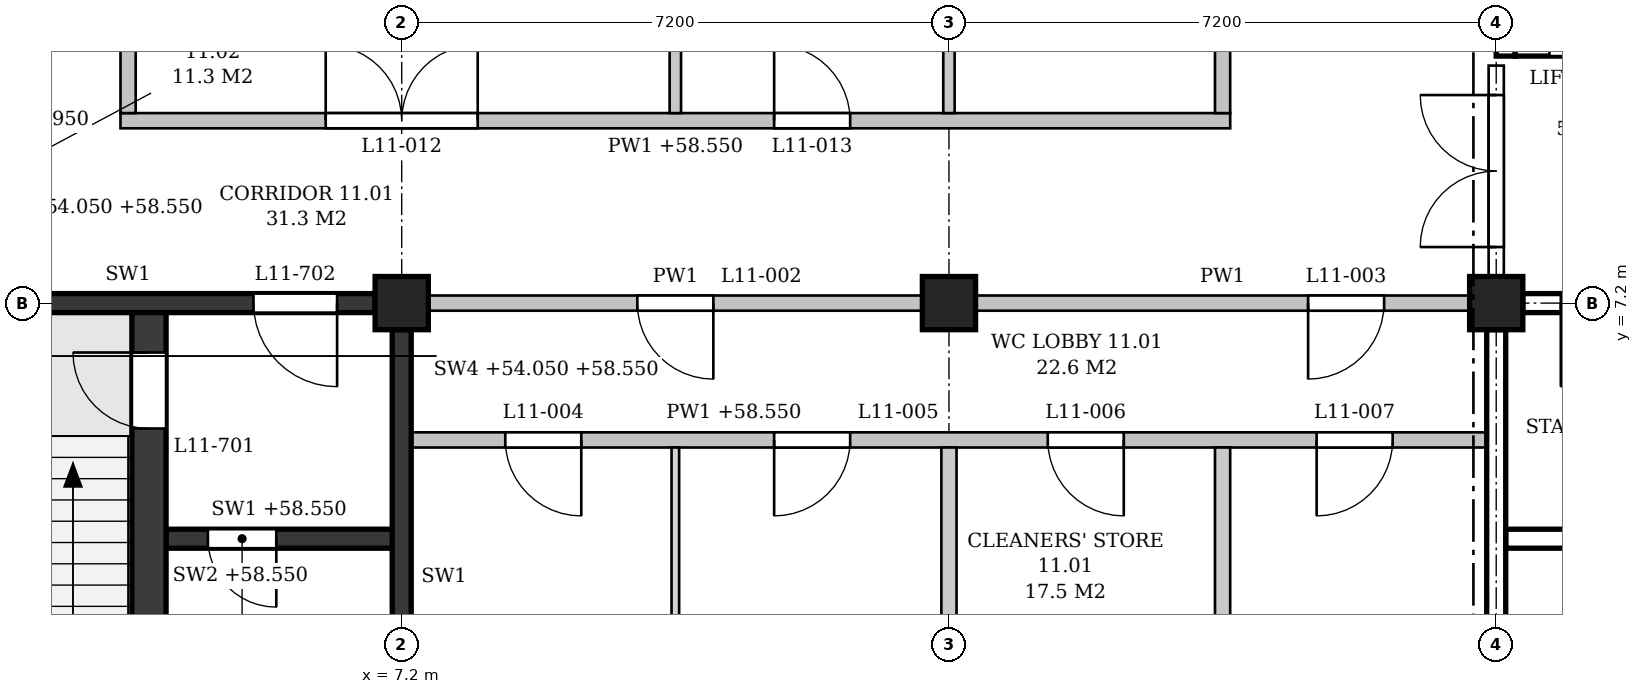
"""IFC4 building model, lengths in metres.
Left out: names, types, materials, properties, quantities, classifications, styles, units other than length and angle.
Written with IfcOpenShell. Run it as: python <this file> out.ifc"""

import sys

from ifc_helpers import new_model, si_unit, direction, frame, frame_2d, origin, origin_2d, place, context, subcontext, project, spatial, polyline, rectangle, outline, extrude, element, fill, save


model = new_model("IFC4")
c1 = context("Model", 3, precision=1e-05, world=origin(), true_north=direction((0.0, 1.0)))
c2 = subcontext(c1, "Body", "Model", "MODEL_VIEW")
j1 = project(units=[si_unit("LENGTHUNIT", "METRE"), si_unit("PLANEANGLEUNIT", "RADIAN")], contexts=[c1])
p1 = place(None, origin())
s1 = spatial("IfcSite", under=j1, at=p1, CompositionType="ELEMENT")
p2 = place(p1, origin())
s2 = spatial("IfcBuilding", under=s1, at=p2, CompositionType="ELEMENT")
p3 = place(p2, frame((0.0, 0.0, 54.3)))
s3 = spatial("IfcBuildingStorey", under=s2, at=p3, CompositionType="ELEMENT", Elevation=54.3)
for number, where, z_axis, x_axis in (
    (1, (7.2, 7.2, 0.0), (0.0, 0.0, 1.0), (1.0, 0.0, 0.0)),
    (2, (14.4, 7.2, 0.0), (0.0, 0.0, 1.0), (1.0, 0.0, 0.0)),
    (3, (21.6, 7.2, 0.0), (0.0, 0.0, 1.0), (1.0, 0.0, 0.0)),
):
    element("IfcColumn", number, at=place(p3, frame(where, z_axis=z_axis, x_axis=x_axis)), inside=s3, PredefinedType="COLUMN", context=c2, shape_type="SweptSolid", body=[
        extrude(rectangle(XDim=0.7, YDim=0.7, at=origin_2d()), origin(), (0.0, 0.0, 1.0), 4.5),
    ])
p4 = place(p3, frame((0.35, 7.2, 0.0), z_axis=(0.0, 0.0, 1.0), x_axis=(1.0, 0.0, 0.0)))
e4 = element("IfcWall", 4, at=p4, inside=s3, PredefinedType="SHEAR", context=c2, shape_type="SweptSolid", body=[
    extrude(rectangle(XDim=6.5, YDim=0.25, at=frame_2d((3.25, 0.0))), origin(), (0.0, 0.0, 1.0), 3.55),
])
p5 = place(p4, frame((4.9, 0.0, 0.0)))
e5 = element("IfcOpeningElement", 5, at=p5, cuts=e4, PredefinedType="OPENING", context=c2, shape_type="SweptSolid", body=[
    extrude(rectangle(XDim=1.1, YDim=2.1, at=frame_2d((0.55, 1.05))), frame((0.0, 0.135, 0.0), z_axis=(0.0, -1.0, 0.0), x_axis=(1.0, 0.0, 0.0)), (0.0, 0.0, 1.0), 0.27),
])
p6 = place(p3, frame((7.2, 0.35, 0.0), z_axis=(0.0, 0.0, 1.0), x_axis=(0.0, 1.0, 0.0)))
e6 = element("IfcWall", 6, at=p6, inside=s3, PredefinedType="SHEAR", context=c2, shape_type="SweptSolid", body=[
    extrude(rectangle(XDim=6.5, YDim=0.25, at=frame_2d((3.25, 0.0))), origin(), (0.0, 0.0, 1.0), 3.55),
])
p7 = place(p3, frame((3.875, 0.15, 0.0), z_axis=(0.0, 0.0, 1.0), x_axis=(0.0, 1.0, 0.0)))
e7 = element("IfcWall", 7, at=p7, inside=s3, PredefinedType="SHEAR", context=c2, shape_type="SweptSolid", body=[
    extrude(rectangle(XDim=6.925, YDim=0.45, at=frame_2d((3.462, 0.0))), origin(), (0.0, 0.0, 1.0), 4.25),
])
p8 = place(p7, frame((5.4, 0.0, 0.0)))
e8 = element("IfcOpeningElement", 8, at=p8, cuts=e7, PredefinedType="OPENING", context=c2, shape_type="SweptSolid", body=[
    extrude(rectangle(XDim=1.0, YDim=2.1, at=frame_2d((0.5, 1.05))), frame((0.0, 0.235, 0.0), z_axis=(0.0, -1.0, 0.0), x_axis=(1.0, 0.0, 0.0)), (0.0, 0.0, 1.0), 0.47),
])
p9 = place(p3, frame((4.1, 4.1, 0.0), z_axis=(0.0, 0.0, 1.0), x_axis=(1.0, 0.0, 0.0)))
e9 = element("IfcWall", 9, at=p9, inside=s3, PredefinedType="SHEAR", context=c2, shape_type="SweptSolid", body=[
    extrude(rectangle(XDim=2.975, YDim=0.25, at=frame_2d((1.487, 0.0))), origin(), (0.0, 0.0, 1.0), 4.25),
])
p10 = place(p9, frame((0.55, 0.0, 0.0)))
e10 = element("IfcOpeningElement", 10, at=p10, cuts=e9, PredefinedType="OPENING", context=c2, shape_type="SweptSolid", body=[
    extrude(rectangle(XDim=0.9, YDim=2.1, at=frame_2d((0.45, 1.05))), frame((0.0, 0.135, 0.0), z_axis=(0.0, -1.0, 0.0), x_axis=(1.0, 0.0, 0.0)), (0.0, 0.0, 1.0), 0.27),
])
p11 = place(p3, frame((21.95, 7.2, 0.0), z_axis=(0.0, 0.0, 1.0), x_axis=(1.0, 0.0, 0.0)))
e11 = element("IfcWall", 11, at=p11, inside=s3, PredefinedType="SHEAR", context=c2, shape_type="SweptSolid", body=[
    extrude(rectangle(XDim=6.5, YDim=0.25, at=frame_2d((3.25, 0.0))), origin(), (0.0, 0.0, 1.0), 3.55),
])
p12 = place(p11, frame((0.5, 0.0, 0.0)))
e12 = element("IfcOpeningElement", 12, at=p12, cuts=e11, PredefinedType="OPENING", context=c2, shape_type="SweptSolid", body=[
    extrude(rectangle(XDim=1.1, YDim=2.1, at=frame_2d((0.55, 1.05))), frame((0.0, 0.135, 0.0), z_axis=(0.0, -1.0, 0.0), x_axis=(1.0, 0.0, 0.0)), (0.0, 0.0, 1.0), 0.27),
])
p13 = place(p3, frame((21.6, 0.35, 0.0), z_axis=(0.0, 0.0, 1.0), x_axis=(0.0, 1.0, 0.0)))
e13 = element("IfcWall", 13, at=p13, inside=s3, PredefinedType="SHEAR", context=c2, shape_type="SweptSolid", body=[
    extrude(rectangle(XDim=6.5, YDim=0.25, at=frame_2d((3.25, 0.0))), origin(), (0.0, 0.0, 1.0), 3.55),
])
p14 = place(p3, frame((21.725, 4.1, 0.0), z_axis=(0.0, 0.0, 1.0), x_axis=(1.0, 0.0, 0.0)))
e14 = element("IfcWall", 14, at=p14, inside=s3, PredefinedType="SHEAR", context=c2, shape_type="SweptSolid", body=[
    extrude(rectangle(XDim=2.975, YDim=0.25, at=frame_2d((1.487, 0.0))), origin(), (0.0, 0.0, 1.0), 4.25),
])
p15 = place(p14, frame((1.525, 0.0, 0.0)))
e15 = element("IfcOpeningElement", 15, at=p15, cuts=e14, PredefinedType="OPENING", context=c2, shape_type="SweptSolid", body=[
    extrude(rectangle(XDim=0.9, YDim=2.1, at=frame_2d((0.45, 1.05))), frame((0.0, 0.135, 0.0), z_axis=(0.0, -1.0, 0.0), x_axis=(1.0, 0.0, 0.0)), (0.0, 0.0, 1.0), 0.27),
])
p16 = place(p3, frame((21.725, 10.45, -0.25), z_axis=(0.0, 0.0, 1.0), x_axis=(0.0, 1.0, 0.0)))
e16 = element("IfcWall", 16, at=p16, inside=s3, PredefinedType="SHEAR", context=c2, shape_type="SweptSolid", body=[
    extrude(rectangle(XDim=3.6, YDim=0.25, at=frame_2d((1.8, 0.0))), origin(), (0.0, 0.0, 1.0), 3.8),
])
p17 = place(p3, frame((21.85, 10.575, -0.25), z_axis=(0.0, 0.0, 1.0), x_axis=(1.0, 0.0, 0.0)))
e17 = element("IfcWall", 17, at=p17, inside=s3, PredefinedType="SHEAR", context=c2, shape_type="SweptSolid", body=[
    extrude(rectangle(XDim=2.0, YDim=0.25, at=frame_2d((1.0, 0.0))), origin(), (0.0, 0.0, 1.0), 4.5),
])
p18 = place(p17, frame((0.45, 0.0, 0.25)))
e18 = element("IfcOpeningElement", 18, at=p18, cuts=e17, PredefinedType="OPENING", context=c2, shape_type="SweptSolid", body=[
    extrude(rectangle(XDim=1.1, YDim=2.1, at=frame_2d((0.55, 1.05))), frame((0.0, 0.135, 0.0), z_axis=(0.0, -1.0, 0.0), x_axis=(1.0, 0.0, 0.0)), (0.0, 0.0, 1.0), 0.27),
])
p19 = place(p3, frame((7.325, 5.4, 0.0), z_axis=(0.0, 0.0, 1.0), x_axis=(1.0, 0.0, 0.0)))
e19 = element("IfcWall", 19, at=p19, inside=s3, PredefinedType="PARTITIONING", context=c2, shape_type="SweptSolid", body=[
    extrude(outline(polyline([(0.0, 0.0), (14.15, 0.0), (14.15, 3.55), (14.05, 3.55), (14.05, 4.25), (7.3, 4.25), (7.3, 3.55), (6.85, 3.55), (6.85, 4.25), (0.1, 4.25), (0.1, 3.55), (0.0, 3.55), (0.0, 0.0)])), frame((0.0, 0.1, 0.0), z_axis=(0.0, -1.0, 0.0), x_axis=(1.0, 0.0, 0.0)), (0.0, 0.0, 1.0), 0.2),
])
p20 = place(p19, frame((1.238, 0.0, 0.0)))
e20 = element("IfcOpeningElement", 20, at=p20, cuts=e19, PredefinedType="OPENING", context=c2, shape_type="SweptSolid", body=[
    extrude(rectangle(XDim=1.0, YDim=2.1, at=frame_2d((0.5, 1.05))), frame((0.0, 0.11, 0.0), z_axis=(0.0, -1.0, 0.0), x_axis=(1.0, 0.0, 0.0)), (0.0, 0.0, 1.0), 0.22),
])
p21 = place(p19, frame((4.775, 0.0, 0.0)))
e21 = element("IfcOpeningElement", 21, at=p21, cuts=e19, PredefinedType="OPENING", context=c2, shape_type="SweptSolid", body=[
    extrude(rectangle(XDim=1.0, YDim=2.1, at=frame_2d((0.5, 1.05))), frame((0.0, 0.11, 0.0), z_axis=(0.0, -1.0, 0.0), x_axis=(1.0, 0.0, 0.0)), (0.0, 0.0, 1.0), 0.22),
])
p22 = place(p19, frame((8.375, 0.0, 0.0)))
e22 = element("IfcOpeningElement", 22, at=p22, cuts=e19, PredefinedType="OPENING", context=c2, shape_type="SweptSolid", body=[
    extrude(rectangle(XDim=1.0, YDim=2.1, at=frame_2d((0.5, 1.05))), frame((0.0, 0.11, 0.0), z_axis=(0.0, -1.0, 0.0), x_axis=(1.0, 0.0, 0.0)), (0.0, 0.0, 1.0), 0.22),
])
p23 = place(p19, frame((11.913, 0.0, 0.0)))
e23 = element("IfcOpeningElement", 23, at=p23, cuts=e19, PredefinedType="OPENING", context=c2, shape_type="SweptSolid", body=[
    extrude(rectangle(XDim=1.0, YDim=2.1, at=frame_2d((0.5, 1.05))), frame((0.0, 0.11, 0.0), z_axis=(0.0, -1.0, 0.0), x_axis=(1.0, 0.0, 0.0)), (0.0, 0.0, 1.0), 0.22),
])
p24 = place(p3, frame((7.55, 7.2, 0.0), z_axis=(0.0, 0.0, 1.0), x_axis=(1.0, 0.0, 0.0)))
e24 = element("IfcWall", 24, at=p24, inside=s3, PredefinedType="PARTITIONING", context=c2, shape_type="SweptSolid", body=[
    extrude(rectangle(XDim=6.5, YDim=0.2, at=frame_2d((3.25, 0.0))), origin(), (0.0, 0.0, 1.0), 3.55),
])
p25 = place(p24, frame((2.75, 0.0, 0.0)))
e25 = element("IfcOpeningElement", 25, at=p25, cuts=e24, PredefinedType="OPENING", context=c2, shape_type="SweptSolid", body=[
    extrude(rectangle(XDim=1.0, YDim=2.1, at=frame_2d((0.5, 1.05))), frame((0.0, 0.11, 0.0), z_axis=(0.0, -1.0, 0.0), x_axis=(1.0, 0.0, 0.0)), (0.0, 0.0, 1.0), 0.22),
])
p26 = place(p3, frame((14.75, 7.2, 0.0), z_axis=(0.0, 0.0, 1.0), x_axis=(1.0, 0.0, 0.0)))
e26 = element("IfcWall", 26, at=p26, inside=s3, PredefinedType="PARTITIONING", context=c2, shape_type="SweptSolid", body=[
    extrude(rectangle(XDim=6.5, YDim=0.2, at=frame_2d((3.25, 0.0))), origin(), (0.0, 0.0, 1.0), 3.55),
])
p27 = place(p26, frame((4.375, 0.0, 0.0)))
e27 = element("IfcOpeningElement", 27, at=p27, cuts=e26, PredefinedType="OPENING", context=c2, shape_type="SweptSolid", body=[
    extrude(rectangle(XDim=1.0, YDim=2.1, at=frame_2d((0.5, 1.05))), frame((0.0, 0.11, 0.0), z_axis=(0.0, -1.0, 0.0), x_axis=(1.0, 0.0, 0.0)), (0.0, 0.0, 1.0), 0.22),
])
p28 = place(p3, frame((3.5, 9.6, 0.0), z_axis=(0.0, 0.0, 1.0), x_axis=(1.0, 0.0, 0.0)))
e28 = element("IfcWall", 28, at=p28, inside=s3, PredefinedType="PARTITIONING", context=c2, shape_type="SweptSolid", body=[
    extrude(outline(polyline([(0.0, 0.0), (14.6, 0.0), (14.6, 4.25), (11.125, 4.25), (11.125, 3.55), (10.675, 3.55), (10.675, 4.25), (3.925, 4.25), (3.925, 3.55), (3.475, 3.55), (3.475, 4.25), (0.0, 4.25), (0.0, 0.0)])), frame((0.0, 0.1, 0.0), z_axis=(0.0, -1.0, 0.0), x_axis=(1.0, 0.0, 0.0)), (0.0, 0.0, 1.0), 0.2),
])
p29 = place(p28, frame((2.7, 0.0, 0.0)))
e29 = element("IfcOpeningElement", 29, at=p29, cuts=e28, PredefinedType="OPENING", context=c2, shape_type="SweptSolid", body=[
    extrude(rectangle(XDim=2.0, YDim=2.1, at=frame_2d((1.0, 1.05))), frame((0.0, 0.11, 0.0), z_axis=(0.0, -1.0, 0.0), x_axis=(1.0, 0.0, 0.0)), (0.0, 0.0, 1.0), 0.22),
])
p30 = place(p28, frame((8.6, 0.0, 0.0)))
e30 = element("IfcOpeningElement", 30, at=p30, cuts=e28, PredefinedType="OPENING", context=c2, shape_type="SweptSolid", body=[
    extrude(rectangle(XDim=1.0, YDim=2.1, at=frame_2d((0.5, 1.05))), frame((0.0, 0.11, 0.0), z_axis=(0.0, -1.0, 0.0), x_axis=(1.0, 0.0, 0.0)), (0.0, 0.0, 1.0), 0.22),
])
p31 = place(p3, frame((3.6, 9.7, 0.0), z_axis=(0.0, 0.0, 1.0), x_axis=(0.0, 1.0, 0.0)))
e31 = element("IfcWall", 31, at=p31, inside=s3, PredefinedType="PARTITIONING", context=c2, shape_type="SweptSolid", body=[
    extrude(rectangle(XDim=1.1, YDim=0.2, at=frame_2d((0.55, 0.0))), origin(), (0.0, 0.0, 1.0), 4.25),
])
p32 = place(p3, frame((10.8, 0.15, 0.0), z_axis=(0.0, 0.0, 1.0), x_axis=(0.0, 1.0, 0.0)))
e32 = element("IfcWall", 32, at=p32, inside=s3, PredefinedType="PARTITIONING", context=c2, shape_type="SweptSolid", body=[
    extrude(rectangle(XDim=5.15, YDim=0.1, at=frame_2d((2.575, 0.0))), origin(), (0.0, 0.0, 1.0), 3.55),
])
p33 = place(p3, frame((10.8, 9.7, 0.0), z_axis=(0.0, 0.0, 1.0), x_axis=(0.0, 1.0, 0.0)))
e33 = element("IfcWall", 33, at=p33, inside=s3, PredefinedType="PARTITIONING", context=c2, shape_type="SweptSolid", body=[
    extrude(rectangle(XDim=4.55, YDim=0.15, at=frame_2d((2.275, 0.0))), origin(), (0.0, 0.0, 1.0), 3.55),
])
p34 = place(p3, frame((14.4, 0.35, 0.0), z_axis=(0.0, 0.0, 1.0), x_axis=(0.0, 1.0, 0.0)))
e34 = element("IfcWall", 34, at=p34, inside=s3, PredefinedType="PARTITIONING", context=c2, shape_type="SweptSolid", body=[
    extrude(rectangle(XDim=4.95, YDim=0.2, at=frame_2d((2.475, 0.0))), origin(), (0.0, 0.0, 1.0), 3.55),
])
p35 = place(p3, frame((14.4, 9.7, 0.0), z_axis=(0.0, 0.0, 1.0), x_axis=(0.0, 1.0, 0.0)))
e35 = element("IfcWall", 35, at=p35, inside=s3, PredefinedType="PARTITIONING", context=c2, shape_type="SweptSolid", body=[
    extrude(rectangle(XDim=4.35, YDim=0.15, at=frame_2d((2.175, 0.0))), origin(), (0.0, 0.0, 1.0), 3.55),
])
p36 = place(p3, frame((18.0, 0.15, 0.0), z_axis=(0.0, 0.0, 1.0), x_axis=(0.0, 1.0, 0.0)))
e36 = element("IfcWall", 36, at=p36, inside=s3, PredefinedType="PARTITIONING", context=c2, shape_type="SweptSolid", body=[
    extrude(outline(polyline([(0.0, 0.0), (5.15, 0.0), (5.15, 4.25), (0.05, 4.25), (0.05, 3.65), (0.0, 3.65), (0.0, 0.0)])), frame((0.0, 0.1, 0.0), z_axis=(0.0, -1.0, 0.0), x_axis=(1.0, 0.0, 0.0)), (0.0, 0.0, 1.0), 0.2),
])
p37 = place(p3, frame((18.0, 9.7, 0.0), z_axis=(0.0, 0.0, 1.0), x_axis=(0.0, 1.0, 0.0)))
e37 = element("IfcWall", 37, at=p37, inside=s3, PredefinedType="PARTITIONING", context=c2, shape_type="SweptSolid", body=[
    extrude(outline(polyline([(0.0, 0.0), (7.1, 0.0), (7.1, 4.25), (4.925, 4.25), (4.925, 3.55), (4.475, 3.55), (4.475, 4.25), (0.0, 4.25), (0.0, 0.0)])), frame((0.0, 0.1, 0.0), z_axis=(0.0, -1.0, 0.0), x_axis=(1.0, 0.0, 0.0)), (0.0, 0.0, 1.0), 0.2),
])
p38 = place(p37, frame((5.4, 0.0, 0.0)))
e38 = element("IfcOpeningElement", 38, at=p38, cuts=e37, PredefinedType="OPENING", context=c2, shape_type="SweptSolid", body=[
    extrude(rectangle(XDim=1.0, YDim=2.1, at=frame_2d((0.5, 1.05))), frame((0.0, 0.11, 0.0), z_axis=(0.0, -1.0, 0.0), x_axis=(1.0, 0.0, 0.0)), (0.0, 0.0, 1.0), 0.22),
])
p39 = place(p37, frame((1.85, 0.0, 0.0)))
e39 = element("IfcOpeningElement", 39, at=p39, cuts=e37, PredefinedType="OPENING", context=c2, shape_type="SweptSolid", body=[
    extrude(rectangle(XDim=1.0, YDim=2.1, at=frame_2d((0.5, 1.05))), frame((0.0, 0.11, 0.0), z_axis=(0.0, -1.0, 0.0), x_axis=(1.0, 0.0, 0.0)), (0.0, 0.0, 1.0), 0.22),
])
p40 = place(p3, frame((21.6, 7.55, 0.0), z_axis=(0.0, 0.0, 1.0), x_axis=(0.0, 1.0, 0.0)))
e40 = element("IfcWall", 40, at=p40, inside=s3, PredefinedType="PARTITIONING", context=c2, shape_type="SweptSolid", body=[
    extrude(rectangle(XDim=2.775, YDim=0.2, at=frame_2d((1.387, 0.0))), origin(), (0.0, 0.0, 1.0), 3.55),
])
p41 = place(p40, frame((0.387, 0.0, 0.0)))
e41 = element("IfcOpeningElement", 41, at=p41, cuts=e40, PredefinedType="OPENING", context=c2, shape_type="SweptSolid", body=[
    extrude(rectangle(XDim=2.0, YDim=2.4, at=frame_2d((1.0, 1.2))), frame((0.0, 0.11, 0.0), z_axis=(0.0, -1.0, 0.0), x_axis=(1.0, 0.0, 0.0)), (0.0, 0.0, 1.0), 0.22),
])
p42 = place(p8, origin())
e42 = element("IfcDoor", 42, at=p42, inside=s3, OperationType="SINGLE_SWING_RIGHT", PredefinedType="DOOR", context=c2, shape_type="SweptSolid", body=[
    extrude(rectangle(XDim=1.0, YDim=2.1, at=frame_2d((0.5, 1.05))), frame((0.0, 0.025, 0.0), z_axis=(0.0, -1.0, 0.0), x_axis=(1.0, 0.0, 0.0)), (0.0, 0.0, 1.0), 0.05),
])
fill(e8, e42)
p43 = place(p5, frame((1.1, 0.0, 0.0), z_axis=(0.0, 0.0, 1.0), x_axis=(-1.0, 0.0, 0.0)))
e43 = element("IfcDoor", 43, at=p43, inside=s3, OperationType="SINGLE_SWING_LEFT", PredefinedType="DOOR", context=c2, shape_type="SweptSolid", body=[
    extrude(rectangle(XDim=1.1, YDim=2.1, at=frame_2d((0.55, 1.05))), frame((0.0, 0.025, 0.0), z_axis=(0.0, -1.0, 0.0), x_axis=(1.0, 0.0, 0.0)), (0.0, 0.0, 1.0), 0.05),
])
fill(e5, e43)
p44 = place(p10, frame((0.9, 0.0, 0.0), z_axis=(0.0, 0.0, 1.0), x_axis=(-1.0, 0.0, 0.0)))
e44 = element("IfcDoor", 44, at=p44, inside=s3, OperationType="SINGLE_SWING_LEFT", PredefinedType="DOOR", context=c2, shape_type="SweptSolid", body=[
    extrude(rectangle(XDim=0.9, YDim=2.1, at=frame_2d((0.45, 1.05))), frame((0.0, 0.025, 0.0), z_axis=(0.0, -1.0, 0.0), x_axis=(1.0, 0.0, 0.0)), (0.0, 0.0, 1.0), 0.05),
])
fill(e10, e44)
p45 = place(p12, frame((1.1, 0.0, 0.0), z_axis=(0.0, 0.0, 1.0), x_axis=(-1.0, 0.0, 0.0)))
e45 = element("IfcDoor", 45, at=p45, inside=s3, OperationType="SINGLE_SWING_RIGHT", PredefinedType="DOOR", context=c2, shape_type="SweptSolid", body=[
    extrude(rectangle(XDim=1.1, YDim=2.1, at=frame_2d((0.55, 1.05))), frame((0.0, 0.025, 0.0), z_axis=(0.0, -1.0, 0.0), x_axis=(1.0, 0.0, 0.0)), (0.0, 0.0, 1.0), 0.05),
])
fill(e12, e45)
p46 = place(p41, origin())
e46 = element("IfcDoor", 46, at=p46, inside=s3, OperationType="DOUBLE_DOOR_SINGLE_SWING", PredefinedType="DOOR", context=c2, shape_type="SweptSolid", body=[
    extrude(rectangle(XDim=2.0, YDim=2.4, at=frame_2d((1.0, 1.2))), frame((0.0, 0.025, 0.0), z_axis=(0.0, -1.0, 0.0), x_axis=(1.0, 0.0, 0.0)), (0.0, 0.0, 1.0), 0.05),
])
fill(e41, e46)
p47 = place(p25, frame((1.0, 0.0, 0.0), z_axis=(0.0, 0.0, 1.0), x_axis=(-1.0, 0.0, 0.0)))
e47 = element("IfcDoor", 47, at=p47, inside=s3, OperationType="SINGLE_SWING_LEFT", PredefinedType="DOOR", context=c2, shape_type="SweptSolid", body=[
    extrude(rectangle(XDim=1.0, YDim=2.1, at=frame_2d((0.5, 1.05))), frame((0.0, 0.025, 0.0), z_axis=(0.0, -1.0, 0.0), x_axis=(1.0, 0.0, 0.0)), (0.0, 0.0, 1.0), 0.05),
])
fill(e25, e47)
p48 = place(p27, frame((1.0, 0.0, 0.0), z_axis=(0.0, 0.0, 1.0), x_axis=(-1.0, 0.0, 0.0)))
e48 = element("IfcDoor", 48, at=p48, inside=s3, OperationType="SINGLE_SWING_RIGHT", PredefinedType="DOOR", context=c2, shape_type="SweptSolid", body=[
    extrude(rectangle(XDim=1.0, YDim=2.1, at=frame_2d((0.5, 1.05))), frame((0.0, 0.025, 0.0), z_axis=(0.0, -1.0, 0.0), x_axis=(1.0, 0.0, 0.0)), (0.0, 0.0, 1.0), 0.05),
])
fill(e27, e48)
p49 = place(p20, frame((1.0, 0.0, 0.0), z_axis=(0.0, 0.0, 1.0), x_axis=(-1.0, 0.0, 0.0)))
e49 = element("IfcDoor", 49, at=p49, inside=s3, OperationType="SINGLE_SWING_LEFT", PredefinedType="DOOR", context=c2, shape_type="SweptSolid", body=[
    extrude(rectangle(XDim=1.0, YDim=2.1, at=frame_2d((0.5, 1.05))), frame((0.0, 0.025, 0.0), z_axis=(0.0, -1.0, 0.0), x_axis=(1.0, 0.0, 0.0)), (0.0, 0.0, 1.0), 0.05),
])
fill(e20, e49)
p50 = place(p21, frame((1.0, 0.0, 0.0), z_axis=(0.0, 0.0, 1.0), x_axis=(-1.0, 0.0, 0.0)))
e50 = element("IfcDoor", 50, at=p50, inside=s3, OperationType="SINGLE_SWING_RIGHT", PredefinedType="DOOR", context=c2, shape_type="SweptSolid", body=[
    extrude(rectangle(XDim=1.0, YDim=2.1, at=frame_2d((0.5, 1.05))), frame((0.0, 0.025, 0.0), z_axis=(0.0, -1.0, 0.0), x_axis=(1.0, 0.0, 0.0)), (0.0, 0.0, 1.0), 0.05),
])
fill(e21, e50)
p51 = place(p22, frame((1.0, 0.0, 0.0), z_axis=(0.0, 0.0, 1.0), x_axis=(-1.0, 0.0, 0.0)))
e51 = element("IfcDoor", 51, at=p51, inside=s3, OperationType="SINGLE_SWING_LEFT", PredefinedType="DOOR", context=c2, shape_type="SweptSolid", body=[
    extrude(rectangle(XDim=1.0, YDim=2.1, at=frame_2d((0.5, 1.05))), frame((0.0, 0.025, 0.0), z_axis=(0.0, -1.0, 0.0), x_axis=(1.0, 0.0, 0.0)), (0.0, 0.0, 1.0), 0.05),
])
fill(e22, e51)
p52 = place(p23, frame((1.0, 0.0, 0.0), z_axis=(0.0, 0.0, 1.0), x_axis=(-1.0, 0.0, 0.0)))
e52 = element("IfcDoor", 52, at=p52, inside=s3, OperationType="SINGLE_SWING_RIGHT", PredefinedType="DOOR", context=c2, shape_type="SweptSolid", body=[
    extrude(rectangle(XDim=1.0, YDim=2.1, at=frame_2d((0.5, 1.05))), frame((0.0, 0.025, 0.0), z_axis=(0.0, -1.0, 0.0), x_axis=(1.0, 0.0, 0.0)), (0.0, 0.0, 1.0), 0.05),
])
fill(e23, e52)
p53 = place(p29, origin())
e53 = element("IfcDoor", 53, at=p53, inside=s3, OperationType="DOUBLE_DOOR_SINGLE_SWING", PredefinedType="DOOR", context=c2, shape_type="SweptSolid", body=[
    extrude(rectangle(XDim=2.0, YDim=2.1, at=frame_2d((1.0, 1.05))), frame((0.0, 0.025, 0.0), z_axis=(0.0, -1.0, 0.0), x_axis=(1.0, 0.0, 0.0)), (0.0, 0.0, 1.0), 0.05),
])
fill(e29, e53)
p54 = place(p30, origin())
e54 = element("IfcDoor", 54, at=p54, inside=s3, OperationType="SINGLE_SWING_LEFT", PredefinedType="DOOR", context=c2, shape_type="SweptSolid", body=[
    extrude(rectangle(XDim=1.0, YDim=2.1, at=frame_2d((0.5, 1.05))), frame((0.0, 0.025, 0.0), z_axis=(0.0, -1.0, 0.0), x_axis=(1.0, 0.0, 0.0)), (0.0, 0.0, 1.0), 0.05),
])
fill(e30, e54)
save(model, sys.argv[1])
